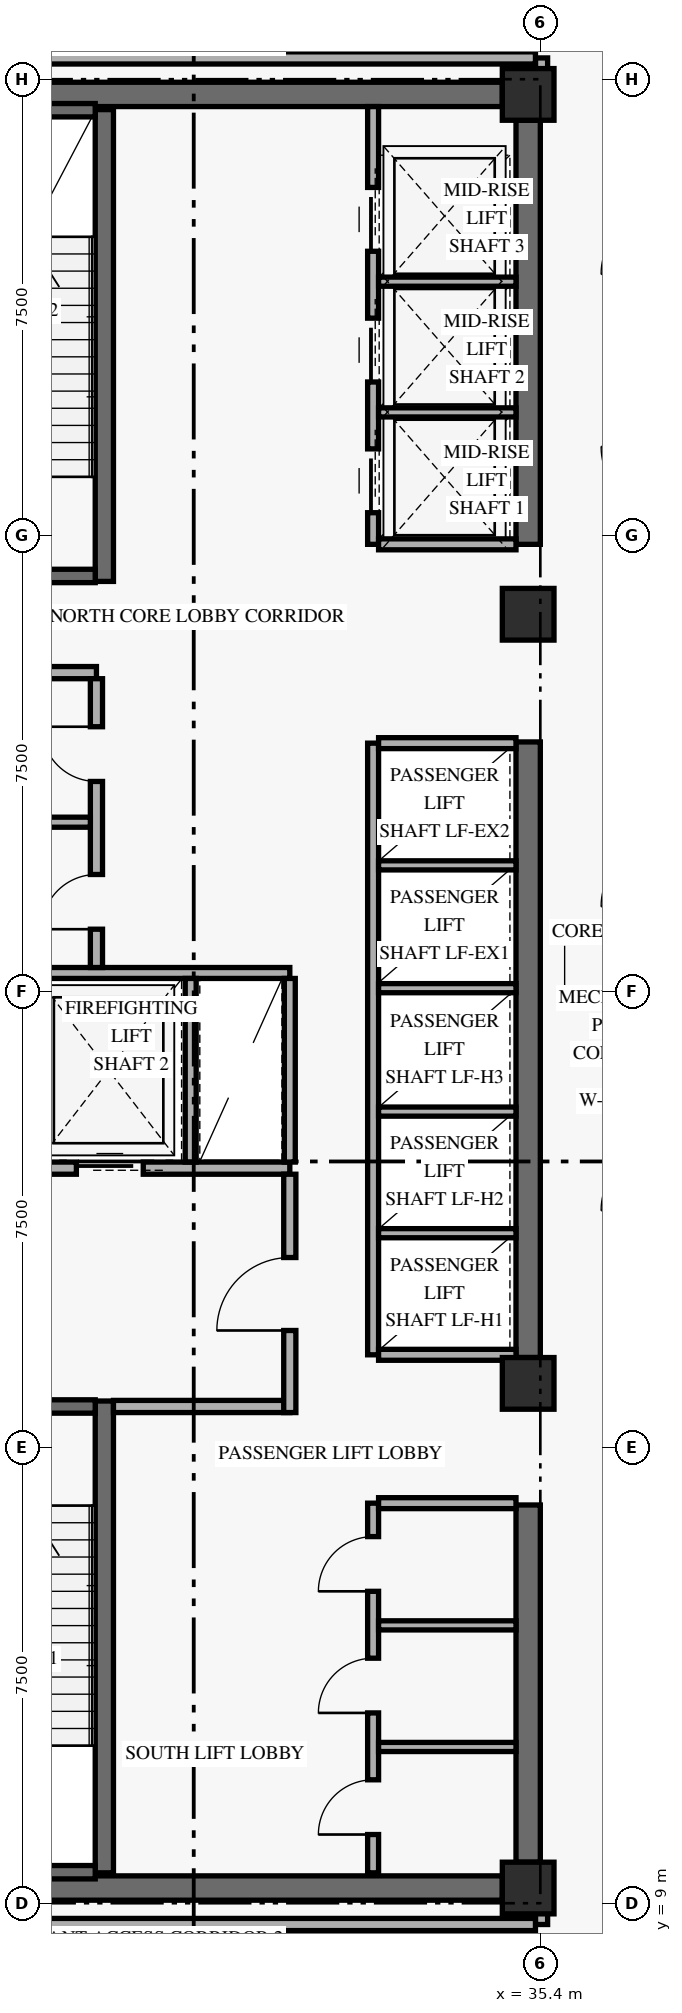
"""IFC4 building model, lengths in metres.
Left out: names, types, materials, properties, quantities, classifications, styles, units other than length and angle.
Written with IfcOpenShell. Run it as: python <this file> out.ifc"""

import sys

from ifc_helpers import new_model, si_unit, direction, frame, frame_2d, origin, origin_2d, place, context, subcontext, project, spatial, rectangle, extrude, element, fill, save


model = new_model("IFC4")
c1 = context("Model", 3, precision=1e-05, world=origin(), true_north=direction((0.0, 1.0)))
c2 = subcontext(c1, "Body", "Model", "MODEL_VIEW")
j1 = project(units=[si_unit("LENGTHUNIT", "METRE"), si_unit("PLANEANGLEUNIT", "RADIAN")], contexts=[c1])
p1 = place(None, origin())
s1 = spatial("IfcSite", under=j1, at=p1, CompositionType="ELEMENT")
p2 = place(p1, origin())
s2 = spatial("IfcBuilding", under=s1, at=p2, CompositionType="ELEMENT")
p3 = place(p2, frame((0.0, 0.0, 135.6)))
s3 = spatial("IfcBuildingStorey", under=s2, at=p3, CompositionType="ELEMENT", Elevation=135.6)
p4 = place(p3, frame((35.2, 9.675, 0.0), z_axis=(0.0, 0.0, 1.0), x_axis=(0.0, 1.0, 0.0)))
e1 = element("IfcWall", 1, at=p4, inside=s3, PredefinedType="SHEAR", context=c2, shape_type="SweptSolid", body=[
    extrude(rectangle(XDim=5.875, YDim=0.4, at=frame_2d((2.938, 0.0))), origin(), (0.0, 0.0, 1.0), 4.549),
])
p5 = place(p3, frame((35.2, 17.975, 0.0), z_axis=(0.0, 0.0, 1.0), x_axis=(0.0, 1.0, 0.0)))
e2 = element("IfcWall", 2, at=p5, inside=s3, PredefinedType="SHEAR", context=c2, shape_type="SweptSolid", body=[
    extrude(rectangle(XDim=10.125, YDim=0.4, at=frame_2d((5.062, 0.0))), origin(), (0.0, 0.0, 1.0), 4.549),
])
p6 = place(p3, frame((35.2, 31.35, 0.0), z_axis=(0.0, 0.0, 1.0), x_axis=(0.0, 1.0, 0.0)))
e3 = element("IfcWall", 3, at=p6, inside=s3, PredefinedType="SHEAR", context=c2, shape_type="SweptSolid", body=[
    extrude(rectangle(XDim=6.975, YDim=0.4, at=frame_2d((3.487, 0.0))), origin(), (0.0, 0.0, 1.0), 4.549),
])
for number, where, z_axis, x_axis in (
    (4, (24.625, 9.25, 0.0), (0.0, 0.0, 1.0), (1.0, 0.0, 0.0)),
    (5, (24.625, 38.75, 0.0), (0.0, 0.0, 1.0), (1.0, 0.0, 0.0)),
):
    element("IfcWall", number, at=place(p3, frame(where, z_axis=z_axis, x_axis=x_axis)), inside=s3, PredefinedType="SHEAR", context=c2, shape_type="SweptSolid", body=[
        extrude(rectangle(XDim=10.15, YDim=0.4, at=frame_2d((5.075, 0.0))), origin(), (0.0, 0.0, 1.0), 5.16),
    ])
p7 = place(p3, frame((28.23, 9.5, 0.0), z_axis=(0.0, 0.0, 1.0), x_axis=(0.0, 1.0, 0.0)))
e6 = element("IfcWall", 6, at=p7, inside=s3, PredefinedType="SHEAR", context=c2, shape_type="SweptSolid", body=[
    extrude(rectangle(XDim=7.76, YDim=0.3, at=frame_2d((3.88, 0.0))), origin(), (0.0, 0.0, 1.0), 5.16),
])
p8 = place(p3, frame((24.92, 9.51, 0.0), z_axis=(0.0, 0.0, 1.0), x_axis=(1.0, 0.0, 0.0)))
e7 = element("IfcWall", 7, at=p8, inside=s3, PredefinedType="SHEAR", context=c2, shape_type="SweptSolid", body=[
    extrude(rectangle(XDim=3.16, YDim=0.22, at=frame_2d((1.58, 0.0))), origin(), (0.0, 0.0, 1.0), 5.16),
])
p9 = place(p3, frame((24.92, 17.17, 0.0), z_axis=(0.0, 0.0, 1.0), x_axis=(1.0, 0.0, 0.0)))
e8 = element("IfcWall", 8, at=p9, inside=s3, PredefinedType="SHEAR", context=c2, shape_type="SweptSolid", body=[
    extrude(rectangle(XDim=3.16, YDim=0.22, at=frame_2d((1.58, 0.0))), origin(), (0.0, 0.0, 1.0), 5.16),
])
p10 = place(p9, frame((0.78, 0.0, 0.0)))
e9 = element("IfcOpeningElement", 9, at=p10, cuts=e8, PredefinedType="OPENING", context=c2, shape_type="SweptSolid", body=[
    extrude(rectangle(XDim=1.05, YDim=2.15, at=frame_2d((0.525, 1.075))), frame((0.0, 0.12, 0.0), z_axis=(0.0, -1.0, 0.0), x_axis=(1.0, 0.0, 0.0)), (0.0, 0.0, 1.0), 0.24),
])
p11 = place(p3, frame((28.23, 30.74, 0.0), z_axis=(0.0, 0.0, 1.0), x_axis=(0.0, 1.0, 0.0)))
e10 = element("IfcWall", 10, at=p11, inside=s3, PredefinedType="SHEAR", context=c2, shape_type="SweptSolid", body=[
    extrude(rectangle(XDim=7.76, YDim=0.3, at=frame_2d((3.88, 0.0))), origin(), (0.0, 0.0, 1.0), 5.16),
])
p12 = place(p3, frame((24.92, 30.83, 0.0), z_axis=(0.0, 0.0, 1.0), x_axis=(1.0, 0.0, 0.0)))
e11 = element("IfcWall", 11, at=p12, inside=s3, PredefinedType="SHEAR", context=c2, shape_type="SweptSolid", body=[
    extrude(rectangle(XDim=3.16, YDim=0.22, at=frame_2d((1.58, 0.0))), origin(), (0.0, 0.0, 1.0), 5.16),
])
p13 = place(p12, frame((0.78, 0.0, 0.0)))
e12 = element("IfcOpeningElement", 12, at=p13, cuts=e11, PredefinedType="OPENING", context=c2, shape_type="SweptSolid", body=[
    extrude(rectangle(XDim=1.05, YDim=2.15, at=frame_2d((0.525, 1.075))), frame((0.0, 0.12, 0.0), z_axis=(0.0, -1.0, 0.0), x_axis=(1.0, 0.0, 0.0)), (0.0, 0.0, 1.0), 0.24),
])
p14 = place(p3, frame((24.92, 38.49, 0.0), z_axis=(0.0, 0.0, 1.0), x_axis=(1.0, 0.0, 0.0)))
e13 = element("IfcWall", 13, at=p14, inside=s3, PredefinedType="SHEAR", context=c2, shape_type="SweptSolid", body=[
    extrude(rectangle(XDim=3.16, YDim=0.22, at=frame_2d((1.58, 0.0))), origin(), (0.0, 0.0, 1.0), 5.16),
])
for number, where, z_axis, x_axis in (
    (14, (35.2, 9.25, 0.0), (0.0, 0.0, 1.0), (1.0, 0.0, 0.0)),
    (15, (35.2, 17.55, 0.0), (0.0, 0.0, 1.0), (1.0, 0.0, 0.0)),
    (16, (35.2, 30.2, 0.0), (0.0, 0.0, 1.0), (1.0, 0.0, 0.0)),
    (17, (35.2, 38.75, 0.0), (0.0, 0.0, 1.0), (1.0, 0.0, 0.0)),
):
    element("IfcColumn", number, at=place(p3, frame(where, z_axis=z_axis, x_axis=x_axis)), inside=s3, PredefinedType="COLUMN", context=c2, shape_type="SweptSolid", body=[
        extrude(rectangle(XDim=0.85, YDim=0.85, at=origin_2d()), origin(), (0.0, 0.0, 1.0), 5.4),
    ])
p15 = place(p3, frame((24.45, 21.09, 0.0), z_axis=(0.0, 0.0, 1.0), x_axis=(1.0, 0.0, 0.0)))
e18 = element("IfcWall", 18, at=p15, inside=s3, PredefinedType="STANDARD", context=c2, shape_type="SweptSolid", body=[
    extrude(rectangle(XDim=6.83, YDim=0.2, at=frame_2d((3.415, 0.0))), origin(), (0.0, 0.0, 1.0), 5.16),
])
p16 = place(p15, frame((0.72, 0.0, 0.0)))
e19 = element("IfcOpeningElement", 19, at=p16, cuts=e18, PredefinedType="OPENING", context=c2, shape_type="SweptSolid", body=[
    extrude(rectangle(XDim=1.1, YDim=2.2, at=frame_2d((0.55, 1.1))), frame((0.0, 0.11, 0.0), z_axis=(0.0, -1.0, 0.0), x_axis=(1.0, 0.0, 0.0)), (0.0, 0.0, 1.0), 0.22),
])
p17 = place(p15, frame((3.32, 0.0, 0.0)))
e20 = element("IfcOpeningElement", 20, at=p17, cuts=e18, PredefinedType="OPENING", context=c2, shape_type="SweptSolid", body=[
    extrude(rectangle(XDim=1.1, YDim=2.2, at=frame_2d((0.55, 1.1))), frame((0.0, 0.11, 0.0), z_axis=(0.0, -1.0, 0.0), x_axis=(1.0, 0.0, 0.0)), (0.0, 0.0, 1.0), 0.22),
])
p18 = place(p3, frame((28.38, 17.17, 0.0), z_axis=(0.0, 0.0, 1.0), x_axis=(1.0, 0.0, 0.0)))
e21 = element("IfcWall", 21, at=p18, inside=s3, PredefinedType="STANDARD", context=c2, shape_type="SweptSolid", body=[
    extrude(rectangle(XDim=2.9, YDim=0.2, at=frame_2d((1.45, 0.0))), origin(), (0.0, 0.0, 1.0), 5.16),
])
p19 = place(p3, frame((31.28, 17.07, 0.0), z_axis=(0.0, 0.0, 1.0), x_axis=(0.0, 1.0, 0.0)))
e22 = element("IfcWall", 22, at=p19, inside=s3, PredefinedType="STANDARD", context=c2, shape_type="SweptSolid", body=[
    extrude(rectangle(XDim=3.92, YDim=0.2, at=frame_2d((1.96, 0.0))), origin(), (0.0, 0.0, 1.0), 4.531),
])
p20 = place(p19, frame((1.35, 0.0, 0.0)))
e23 = element("IfcOpeningElement", 23, at=p20, cuts=e22, PredefinedType="OPENING", context=c2, shape_type="SweptSolid", body=[
    extrude(rectangle(XDim=1.2, YDim=2.15, at=frame_2d((0.6, 1.075))), frame((0.0, 0.11, 0.0), z_axis=(0.0, -1.0, 0.0), x_axis=(1.0, 0.0, 0.0)), (0.0, 0.0, 1.0), 0.22),
])
p21 = place(p3, frame((24.45, 24.3, 0.0), z_axis=(0.0, 0.0, 1.0), x_axis=(1.0, 0.0, 0.0)))
e24 = element("IfcWall", 24, at=p21, inside=s3, PredefinedType="STANDARD", context=c2, shape_type="SweptSolid", body=[
    extrude(rectangle(XDim=6.83, YDim=0.18, at=frame_2d((3.415, 0.0))), origin(), (0.0, 0.0, 1.0), 5.16),
])
for number, where, z_axis, x_axis in (
    (25, (29.65, 21.19, 0.0), (0.0, 0.0, 1.0), (0.0, 1.0, 0.0)),
    (26, (31.28, 21.19, 0.0), (0.0, 0.0, 1.0), (0.0, 1.0, 0.0)),
):
    element("IfcWall", number, at=place(p3, frame(where, z_axis=z_axis, x_axis=x_axis)), inside=s3, PredefinedType="STANDARD", context=c2, shape_type="SweptSolid", body=[
        extrude(rectangle(XDim=3.02, YDim=0.18, at=frame_2d((1.51, 0.0))), origin(), (0.0, 0.0, 1.0), 5.16),
    ])
p22 = place(p3, frame((24.45, 29.24, 0.0), z_axis=(0.0, 0.0, 1.0), x_axis=(1.0, 0.0, 0.0)))
e27 = element("IfcWall", 27, at=p22, inside=s3, PredefinedType="STANDARD", context=c2, shape_type="SweptSolid", body=[
    extrude(rectangle(XDim=3.65, YDim=0.2, at=frame_2d((1.825, 0.0))), origin(), (0.0, 0.0, 1.0), 5.16),
])
p23 = place(p3, frame((28.1, 24.39, 0.0), z_axis=(0.0, 0.0, 1.0), x_axis=(0.0, 1.0, 0.0)))
e28 = element("IfcWall", 28, at=p23, inside=s3, PredefinedType="STANDARD", context=c2, shape_type="SweptSolid", body=[
    extrude(rectangle(XDim=4.75, YDim=0.2, at=frame_2d((2.375, 0.0))), origin(), (0.0, 0.0, 1.0), 5.16),
])
p24 = place(p23, frame((0.63, 0.0, 0.0)))
e29 = element("IfcOpeningElement", 29, at=p24, cuts=e28, PredefinedType="OPENING", context=c2, shape_type="SweptSolid", body=[
    extrude(rectangle(XDim=0.9, YDim=2.1, at=frame_2d((0.45, 1.05))), frame((0.0, 0.11, 0.0), z_axis=(0.0, -1.0, 0.0), x_axis=(1.0, 0.0, 0.0)), (0.0, 0.0, 1.0), 0.22),
])
p25 = place(p23, frame((3.06, 0.0, 0.0)))
e30 = element("IfcOpeningElement", 30, at=p25, cuts=e28, PredefinedType="OPENING", context=c2, shape_type="SweptSolid", body=[
    extrude(rectangle(XDim=0.9, YDim=2.1, at=frame_2d((0.45, 1.05))), frame((0.0, 0.11, 0.0), z_axis=(0.0, -1.0, 0.0), x_axis=(1.0, 0.0, 0.0)), (0.0, 0.0, 1.0), 0.22),
])
p26 = place(p3, frame((24.45, 26.78, 0.0), z_axis=(0.0, 0.0, 1.0), x_axis=(1.0, 0.0, 0.0)))
e31 = element("IfcWall", 31, at=p26, inside=s3, PredefinedType="PARTITIONING", context=c2, shape_type="SweptSolid", body=[
    extrude(rectangle(XDim=3.55, YDim=0.165, at=frame_2d((1.775, 0.0))), origin(), (0.0, 0.0, 1.0), 5.16),
])
p27 = place(p3, frame((32.65, 9.5, 0.0), z_axis=(0.0, 0.0, 1.0), x_axis=(0.0, 1.0, 0.0)))
e32 = element("IfcWall", 32, at=p27, inside=s3, PredefinedType="STANDARD", context=c2, shape_type="SweptSolid", body=[
    extrude(rectangle(XDim=6.08, YDim=0.18, at=frame_2d((3.04, 0.0))), origin(), (0.0, 0.0, 1.0), 5.16),
])
p28 = place(p27, frame((0.63, 0.0, 0.0)))
e33 = element("IfcOpeningElement", 33, at=p28, cuts=e32, PredefinedType="OPENING", context=c2, shape_type="SweptSolid", body=[
    extrude(rectangle(XDim=0.9, YDim=2.1, at=frame_2d((0.45, 1.05))), frame((0.0, 0.1, 0.0), z_axis=(0.0, -1.0, 0.0), x_axis=(1.0, 0.0, 0.0)), (0.0, 0.0, 1.0), 0.2),
])
p29 = place(p27, frame((2.63, 0.0, 0.0)))
e34 = element("IfcOpeningElement", 34, at=p29, cuts=e32, PredefinedType="OPENING", context=c2, shape_type="SweptSolid", body=[
    extrude(rectangle(XDim=0.9, YDim=2.1, at=frame_2d((0.45, 1.05))), frame((0.0, 0.1, 0.0), z_axis=(0.0, -1.0, 0.0), x_axis=(1.0, 0.0, 0.0)), (0.0, 0.0, 1.0), 0.2),
])
p30 = place(p27, frame((4.63, 0.0, 0.0)))
e35 = element("IfcOpeningElement", 35, at=p30, cuts=e32, PredefinedType="OPENING", context=c2, shape_type="SweptSolid", body=[
    extrude(rectangle(XDim=0.9, YDim=2.1, at=frame_2d((0.45, 1.05))), frame((0.0, 0.1, 0.0), z_axis=(0.0, -1.0, 0.0), x_axis=(1.0, 0.0, 0.0)), (0.0, 0.0, 1.0), 0.2),
])
p31 = place(p3, frame((32.74, 15.58, 0.0), z_axis=(0.0, 0.0, 1.0), x_axis=(1.0, 0.0, 0.0)))
e36 = element("IfcWall", 36, at=p31, inside=s3, PredefinedType="STANDARD", context=c2, shape_type="SweptSolid", body=[
    extrude(rectangle(XDim=2.26, YDim=0.18, at=frame_2d((1.13, 0.0))), origin(), (0.0, 0.0, 1.0), 5.16),
])
for number, where, z_axis, x_axis in (
    (37, (32.74, 11.57, 0.0), (0.0, 0.0, 1.0), (1.0, 0.0, 0.0)),
    (38, (32.74, 13.57, 0.0), (0.0, 0.0, 1.0), (1.0, 0.0, 0.0)),
):
    element("IfcWall", number, at=place(p3, frame(where, z_axis=z_axis, x_axis=x_axis)), inside=s3, PredefinedType="STANDARD", context=c2, shape_type="SweptSolid", body=[
        extrude(rectangle(XDim=2.26, YDim=0.15, at=frame_2d((1.13, 0.0))), origin(), (0.0, 0.0, 1.0), 5.16),
    ])
p32 = place(p3, frame((32.65, 18.02, 0.0), z_axis=(0.0, 0.0, 1.0), x_axis=(0.0, 1.0, 0.0)))
e39 = element("IfcWall", 39, at=p32, inside=s3, PredefinedType="STANDARD", context=c2, shape_type="SweptSolid", body=[
    extrude(rectangle(XDim=10.06, YDim=0.18, at=frame_2d((5.03, 0.0))), origin(), (0.0, 0.0, 1.0), 5.16),
])
for number, where, z_axis, x_axis in (
    (40, (32.74, 18.02, 0.0), (0.0, 0.0, 1.0), (1.0, 0.0, 0.0)),
    (41, (32.74, 28.08, 0.0), (0.0, 0.0, 1.0), (1.0, 0.0, 0.0)),
):
    element("IfcWall", number, at=place(p3, frame(where, z_axis=z_axis, x_axis=x_axis)), inside=s3, PredefinedType="STANDARD", context=c2, shape_type="SweptSolid", body=[
        extrude(rectangle(XDim=2.26, YDim=0.18, at=frame_2d((1.13, 0.0))), origin(), (0.0, 0.0, 1.0), 5.16),
    ])
for number, where, z_axis, x_axis in (
    (42, (32.74, 20.02, 0.0), (0.0, 0.0, 1.0), (1.0, 0.0, 0.0)),
    (43, (32.74, 22.02, 0.0), (0.0, 0.0, 1.0), (1.0, 0.0, 0.0)),
    (44, (32.74, 24.05, 0.0), (0.0, 0.0, 1.0), (1.0, 0.0, 0.0)),
    (45, (32.74, 26.07, 0.0), (0.0, 0.0, 1.0), (1.0, 0.0, 0.0)),
):
    element("IfcWall", number, at=place(p3, frame(where, z_axis=z_axis, x_axis=x_axis)), inside=s3, PredefinedType="STANDARD", context=c2, shape_type="SweptSolid", body=[
        extrude(rectangle(XDim=2.26, YDim=0.15, at=frame_2d((1.13, 0.0))), origin(), (0.0, 0.0, 1.0), 5.16),
    ])
p33 = place(p3, frame((32.65, 31.35, 0.0), z_axis=(0.0, 0.0, 1.0), x_axis=(0.0, 1.0, 0.0)))
e46 = element("IfcWall", 46, at=p33, inside=s3, PredefinedType="STANDARD", context=c2, shape_type="SweptSolid", body=[
    extrude(rectangle(XDim=7.2, YDim=0.18, at=frame_2d((3.6, 0.0))), origin(), (0.0, 0.0, 1.0), 5.16),
])
p34 = place(p33, frame((0.52, 0.0, 0.0)))
e47 = element("IfcOpeningElement", 47, at=p34, cuts=e46, PredefinedType="OPENING", context=c2, shape_type="SweptSolid", body=[
    extrude(rectangle(XDim=1.05, YDim=2.2, at=frame_2d((0.525, 1.1))), frame((0.0, 0.1, 0.0), z_axis=(0.0, -1.0, 0.0), x_axis=(1.0, 0.0, 0.0)), (0.0, 0.0, 1.0), 0.2),
])
p35 = place(p33, frame((2.67, 0.0, 0.0)))
e48 = element("IfcOpeningElement", 48, at=p35, cuts=e46, PredefinedType="OPENING", context=c2, shape_type="SweptSolid", body=[
    extrude(rectangle(XDim=1.05, YDim=2.2, at=frame_2d((0.525, 1.1))), frame((0.0, 0.1, 0.0), z_axis=(0.0, -1.0, 0.0), x_axis=(1.0, 0.0, 0.0)), (0.0, 0.0, 1.0), 0.2),
])
p36 = place(p33, frame((4.82, 0.0, 0.0)))
e49 = element("IfcOpeningElement", 49, at=p36, cuts=e46, PredefinedType="OPENING", context=c2, shape_type="SweptSolid", body=[
    extrude(rectangle(XDim=1.05, YDim=2.2, at=frame_2d((0.525, 1.1))), frame((0.0, 0.1, 0.0), z_axis=(0.0, -1.0, 0.0), x_axis=(1.0, 0.0, 0.0)), (0.0, 0.0, 1.0), 0.2),
])
p37 = place(p3, frame((32.74, 31.35, 0.0), z_axis=(0.0, 0.0, 1.0), x_axis=(1.0, 0.0, 0.0)))
e50 = element("IfcWall", 50, at=p37, inside=s3, PredefinedType="STANDARD", context=c2, shape_type="SweptSolid", body=[
    extrude(rectangle(XDim=2.26, YDim=0.18, at=frame_2d((1.13, 0.0))), origin(), (0.0, 0.0, 1.0), 5.16),
])
for number, where, z_axis, x_axis in (
    (51, (32.74, 33.52, 0.0), (0.0, 0.0, 1.0), (1.0, 0.0, 0.0)),
    (52, (32.74, 35.67, 0.0), (0.0, 0.0, 1.0), (1.0, 0.0, 0.0)),
):
    element("IfcWall", number, at=place(p3, frame(where, z_axis=z_axis, x_axis=x_axis)), inside=s3, PredefinedType="STANDARD", context=c2, shape_type="SweptSolid", body=[
        extrude(rectangle(XDim=2.26, YDim=0.15, at=frame_2d((1.13, 0.0))), origin(), (0.0, 0.0, 1.0), 5.16),
    ])
for number, where, z_axis, x_axis in (
    (53, (35.42, 8.65, 0.0), (0.0, 0.0, 1.0), (0.0, 1.0, 0.0)),
    (54, (35.42, 38.75, 0.0), (0.0, 0.0, 1.0), (0.0, 1.0, 0.0)),
):
    element("IfcWall", number, at=place(p3, frame(where, z_axis=z_axis, x_axis=x_axis)), inside=s3, PredefinedType="STANDARD", context=c2, shape_type="SweptSolid", body=[
        extrude(rectangle(XDim=0.6, YDim=0.2, at=frame_2d((0.3, 0.0))), origin(), (0.0, 0.0, 1.0), 4.531),
    ])
for number, where, z_axis, x_axis in (
    (55, (23.85, 39.35, 0.0), (0.0, 0.0, 1.0), (1.0, 0.0, 0.0)),
    (56, (23.85, 8.65, 0.0), (0.0, 0.0, 1.0), (1.0, 0.0, 0.0)),
):
    element("IfcWall", number, at=place(p3, frame(where, z_axis=z_axis, x_axis=x_axis)), inside=s3, PredefinedType="STANDARD", context=c2, shape_type="SweptSolid", body=[
        extrude(rectangle(XDim=11.47, YDim=0.2, at=frame_2d((5.735, 0.0))), origin(), (0.0, 0.0, 1.0), 4.531),
    ])
p38 = place(p17, origin())
e57 = element("IfcDoor", 57, at=p38, inside=s3, OperationType="SLIDING_TO_LEFT", PredefinedType="DOOR", context=c2, shape_type="SweptSolid", body=[
    extrude(rectangle(XDim=1.1, YDim=2.2, at=frame_2d((0.55, 1.1))), frame((0.0, 0.025, 0.0), z_axis=(0.0, -1.0, 0.0), x_axis=(1.0, 0.0, 0.0)), (0.0, 0.0, 1.0), 0.05),
])
fill(e20, e57)
p39 = place(p20, origin())
e58 = element("IfcDoor", 58, at=p39, inside=s3, OperationType="SINGLE_SWING_LEFT", PredefinedType="DOOR", context=c2, shape_type="SweptSolid", body=[
    extrude(rectangle(XDim=1.2, YDim=2.15, at=frame_2d((0.6, 1.075))), frame((0.0, 0.025, 0.0), z_axis=(0.0, -1.0, 0.0), x_axis=(1.0, 0.0, 0.0)), (0.0, 0.0, 1.0), 0.05),
])
fill(e23, e58)
p40 = place(p24, origin())
e59 = element("IfcDoor", 59, at=p40, inside=s3, OperationType="SINGLE_SWING_LEFT", PredefinedType="DOOR", context=c2, shape_type="SweptSolid", body=[
    extrude(rectangle(XDim=0.9, YDim=2.1, at=frame_2d((0.45, 1.05))), frame((0.0, 0.025, 0.0), z_axis=(0.0, -1.0, 0.0), x_axis=(1.0, 0.0, 0.0)), (0.0, 0.0, 1.0), 0.05),
])
fill(e29, e59)
p41 = place(p25, origin())
e60 = element("IfcDoor", 60, at=p41, inside=s3, OperationType="SINGLE_SWING_RIGHT", PredefinedType="DOOR", context=c2, shape_type="SweptSolid", body=[
    extrude(rectangle(XDim=0.9, YDim=2.1, at=frame_2d((0.45, 1.05))), frame((0.0, 0.025, 0.0), z_axis=(0.0, -1.0, 0.0), x_axis=(1.0, 0.0, 0.0)), (0.0, 0.0, 1.0), 0.05),
])
fill(e30, e60)
p42 = place(p28, origin())
e61 = element("IfcDoor", 61, at=p42, inside=s3, OperationType="SINGLE_SWING_LEFT", PredefinedType="DOOR", context=c2, shape_type="SweptSolid", body=[
    extrude(rectangle(XDim=0.9, YDim=2.1, at=frame_2d((0.45, 1.05))), frame((0.0, 0.025, 0.0), z_axis=(0.0, -1.0, 0.0), x_axis=(1.0, 0.0, 0.0)), (0.0, 0.0, 1.0), 0.05),
])
fill(e33, e61)
p43 = place(p29, origin())
e62 = element("IfcDoor", 62, at=p43, inside=s3, OperationType="SINGLE_SWING_LEFT", PredefinedType="DOOR", context=c2, shape_type="SweptSolid", body=[
    extrude(rectangle(XDim=0.9, YDim=2.1, at=frame_2d((0.45, 1.05))), frame((0.0, 0.025, 0.0), z_axis=(0.0, -1.0, 0.0), x_axis=(1.0, 0.0, 0.0)), (0.0, 0.0, 1.0), 0.05),
])
fill(e34, e62)
p44 = place(p30, origin())
e63 = element("IfcDoor", 63, at=p44, inside=s3, OperationType="SINGLE_SWING_LEFT", PredefinedType="DOOR", context=c2, shape_type="SweptSolid", body=[
    extrude(rectangle(XDim=0.9, YDim=2.1, at=frame_2d((0.45, 1.05))), frame((0.0, 0.025, 0.0), z_axis=(0.0, -1.0, 0.0), x_axis=(1.0, 0.0, 0.0)), (0.0, 0.0, 1.0), 0.05),
])
fill(e35, e63)
p45 = place(p34, origin())
e64 = element("IfcDoor", 64, at=p45, inside=s3, OperationType="SLIDING_TO_LEFT", PredefinedType="DOOR", context=c2, shape_type="SweptSolid", body=[
    extrude(rectangle(XDim=1.05, YDim=2.2, at=frame_2d((0.525, 1.1))), frame((0.0, 0.025, 0.0), z_axis=(0.0, -1.0, 0.0), x_axis=(1.0, 0.0, 0.0)), (0.0, 0.0, 1.0), 0.05),
])
fill(e47, e64)
p46 = place(p35, origin())
e65 = element("IfcDoor", 65, at=p46, inside=s3, OperationType="SLIDING_TO_LEFT", PredefinedType="DOOR", context=c2, shape_type="SweptSolid", body=[
    extrude(rectangle(XDim=1.05, YDim=2.2, at=frame_2d((0.525, 1.1))), frame((0.0, 0.025, 0.0), z_axis=(0.0, -1.0, 0.0), x_axis=(1.0, 0.0, 0.0)), (0.0, 0.0, 1.0), 0.05),
])
fill(e48, e65)
p47 = place(p36, origin())
e66 = element("IfcDoor", 66, at=p47, inside=s3, OperationType="SLIDING_TO_LEFT", PredefinedType="DOOR", context=c2, shape_type="SweptSolid", body=[
    extrude(rectangle(XDim=1.05, YDim=2.2, at=frame_2d((0.525, 1.1))), frame((0.0, 0.025, 0.0), z_axis=(0.0, -1.0, 0.0), x_axis=(1.0, 0.0, 0.0)), (0.0, 0.0, 1.0), 0.05),
])
fill(e49, e66)
save(model, sys.argv[1])
